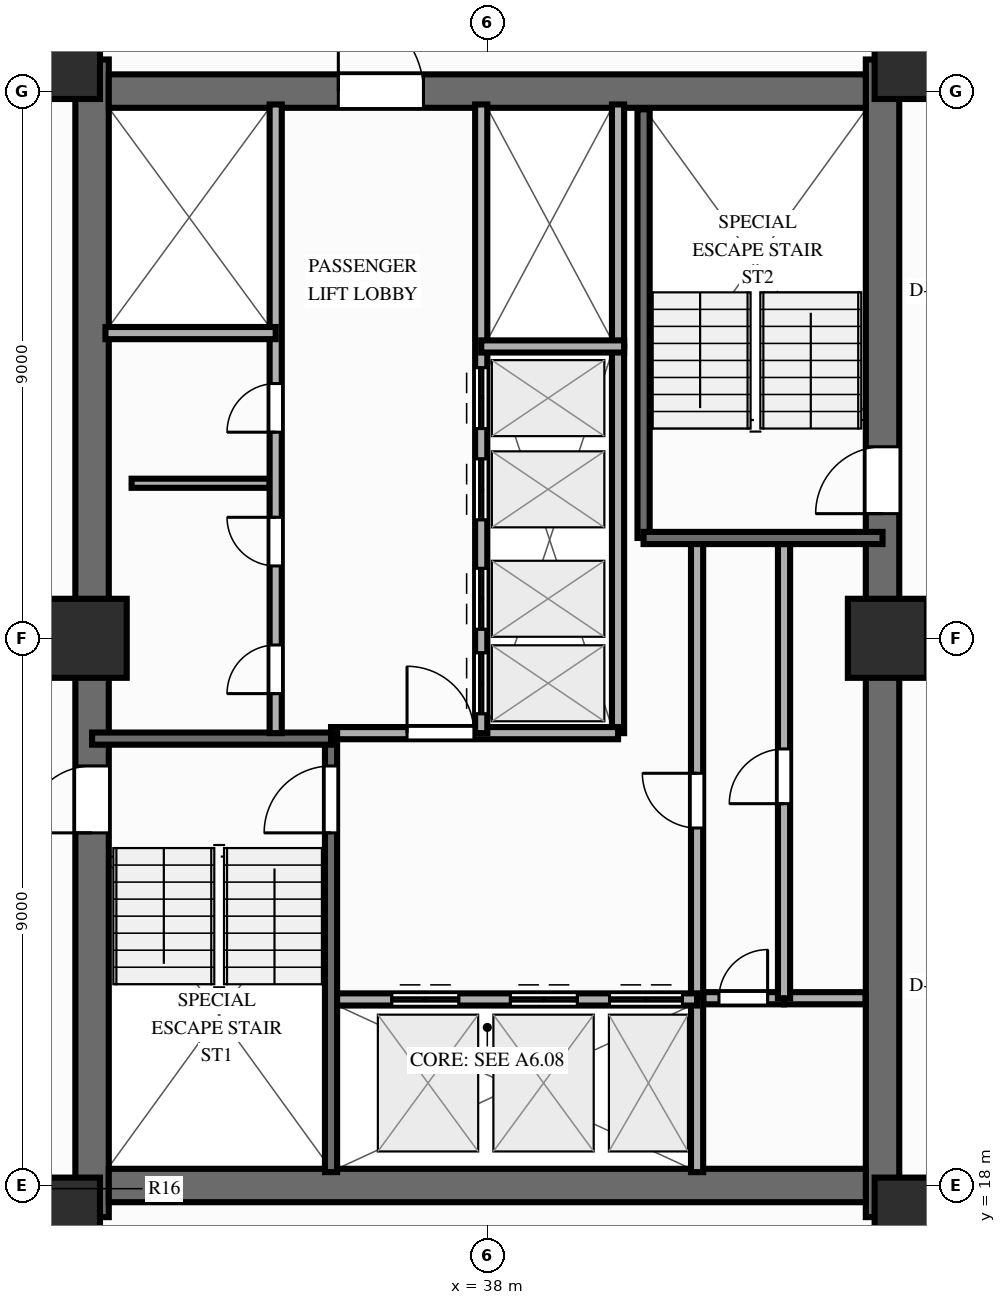
"""IFC4 building model, lengths in metres.
Left out: names, types, materials, properties, quantities, classifications, styles, units other than length and angle.
Written with IfcOpenShell. Run it as: python <this file> out.ifc"""

import sys

from ifc_helpers import new_model, si_unit, direction, frame, frame_2d, origin, origin_2d, place, context, subcontext, project, spatial, rectangle, extrude, source, transform, mapped, element, fill, save


model = new_model("IFC4")
c1 = context("Model", 3, precision=1e-05, world=origin(), true_north=direction((0.0, 1.0)))
c2 = subcontext(c1, "Body", "Model", "MODEL_VIEW")
j1 = project(units=[si_unit("LENGTHUNIT", "METRE"), si_unit("PLANEANGLEUNIT", "RADIAN")], contexts=[c1])
p1 = place(None, origin())
s1 = spatial("IfcSite", under=j1, at=p1, CompositionType="ELEMENT")
p2 = place(p1, origin())
s2 = spatial("IfcBuilding", under=s1, at=p2, CompositionType="ELEMENT")
p3 = place(p2, frame((0.0, 0.0, 104.85)))
s3 = spatial("IfcBuildingStorey", under=s2, at=p3, CompositionType="ELEMENT", Elevation=104.85)
p4 = place(p3, frame((31.5, 17.48, 0.0), z_axis=(0.0, 0.0, 1.0), x_axis=(0.0, 1.0, 0.0)))
e1 = element("IfcWall", 1, at=p4, inside=s3, PredefinedType="SHEAR", context=c2, shape_type="SweptSolid", body=[
    extrude(rectangle(XDim=19.04, YDim=0.55, at=frame_2d((9.52, 0.0))), origin(), (0.0, 0.0, 1.0), 3.0),
])
p5 = place(p4, frame((6.32, 0.0, 0.0)))
e2 = element("IfcOpeningElement", 2, at=p5, cuts=e1, PredefinedType="OPENING", context=c2, shape_type="SweptSolid", body=[
    extrude(rectangle(XDim=1.1, YDim=2.15, at=frame_2d((0.55, 1.075))), frame((0.0, 0.287, 0.0), z_axis=(0.0, -1.0, 0.0), x_axis=(1.0, 0.0, 0.0)), (0.0, 0.0, 1.0), 0.574),
])
p6 = place(p3, frame((44.5, 17.48, 0.0), z_axis=(0.0, 0.0, 1.0), x_axis=(0.0, 1.0, 0.0)))
e3 = element("IfcWall", 3, at=p6, inside=s3, PredefinedType="SHEAR", context=c2, shape_type="SweptSolid", body=[
    extrude(rectangle(XDim=19.04, YDim=0.55, at=frame_2d((9.52, 0.0))), origin(), (0.0, 0.0, 1.0), 3.0),
])
p7 = place(p6, frame((12.67, 0.0, 0.0), z_axis=(0.0, 0.0, 1.0), x_axis=(-1.0, 0.0, 0.0)))
e4 = element("IfcOpeningElement", 4, at=p7, cuts=e3, PredefinedType="OPENING", context=c2, shape_type="SweptSolid", body=[
    extrude(rectangle(XDim=1.1, YDim=2.15, at=frame_2d((0.55, 1.075))), frame((0.0, 0.287, 0.0), z_axis=(0.0, -1.0, 0.0), x_axis=(1.0, 0.0, 0.0)), (0.0, 0.0, 1.0), 0.574),
])
p8 = place(p3, frame((31.775, 18.0, 0.0), z_axis=(0.0, 0.0, 1.0), x_axis=(1.0, 0.0, 0.0)))
e5 = element("IfcWall", 5, at=p8, inside=s3, PredefinedType="SHEAR", context=c2, shape_type="SweptSolid", body=[
    extrude(rectangle(XDim=12.45, YDim=0.55, at=frame_2d((6.225, 0.0))), origin(), (0.0, 0.0, 1.0), 3.0),
])
p9 = place(p3, frame((31.775, 36.0, 0.0), z_axis=(0.0, 0.0, 1.0), x_axis=(1.0, 0.0, 0.0)))
e6 = element("IfcWall", 6, at=p9, inside=s3, PredefinedType="SHEAR", context=c2, shape_type="SweptSolid", body=[
    extrude(rectangle(XDim=12.45, YDim=0.55, at=frame_2d((6.225, 0.0))), origin(), (0.0, 0.0, 1.0), 3.0),
])
p10 = place(p9, frame((5.175, 0.0, 0.0), z_axis=(0.0, 0.0, 1.0), x_axis=(-1.0, 0.0, 0.0)))
e7 = element("IfcOpeningElement", 7, at=p10, cuts=e6, PredefinedType="OPENING", context=c2, shape_type="SweptSolid", body=[
    extrude(rectangle(XDim=1.4, YDim=2.15, at=frame_2d((0.7, 1.075))), frame((0.0, 0.287, 0.0), z_axis=(0.0, -1.0, 0.0), x_axis=(1.0, 0.0, 0.0)), (0.0, 0.0, 1.0), 0.574),
])
m1 = source(origin(), c2, "Body", "SweptSolid", [
    extrude(rectangle(XDim=1.3, YDim=1.3, at=origin_2d()), origin(), (0.0, 0.0, 1.0), 3.0),
])
for number, where, z_axis, x_axis in (
    (8, (30.98, 17.48, 0.0), (0.0, 0.0, 1.0), (1.0, 0.0, 0.0)),
    (9, (45.02, 17.48, 0.0), (0.0, 0.0, 1.0), (1.0, 0.0, 0.0)),
    (10, (30.98, 36.52, 0.0), (0.0, 0.0, 1.0), (1.0, 0.0, 0.0)),
    (11, (45.02, 36.52, 0.0), (0.0, 0.0, 1.0), (1.0, 0.0, 0.0)),
    (12, (31.42, 27.0, 0.0), (0.0, 0.0, 1.0), (1.0, 0.0, 0.0)),
    (13, (44.58, 27.0, 0.0), (0.0, 0.0, 1.0), (1.0, 0.0, 0.0)),
):
    element("IfcColumn", number, at=place(p3, frame(where, z_axis=z_axis, x_axis=x_axis)), inside=s3, PredefinedType="COLUMN", context=c2, shape_type="MappedRepresentation", body=[
        mapped(m1, transform((0.0, 0.0, 0.0), scale=1.0)),
    ])
p11 = place(p3, frame((32.15, 29.55, 0.0), z_axis=(0.0, 0.0, 1.0), x_axis=(1.0, 0.0, 0.0)))
e14 = element("IfcWall", 14, at=p11, inside=s3, PredefinedType="PARTITIONING", context=c2, shape_type="SweptSolid", body=[
    extrude(rectangle(XDim=2.27, YDim=0.15, at=frame_2d((1.135, 0.0))), origin(), (0.0, 0.0, 1.0), 2.79),
])
p12 = place(p3, frame((41.55, 21.08, 0.0), z_axis=(0.0, 0.0, 1.0), x_axis=(1.0, 0.0, 0.0)))
e15 = element("IfcWall", 15, at=p12, inside=s3, PredefinedType="PARTITIONING", context=c2, shape_type="SweptSolid", body=[
    extrude(rectangle(XDim=1.33, YDim=0.2, at=frame_2d((0.665, 0.0))), origin(), (0.0, 0.0, 1.0), 2.79),
])
p13 = place(p12, frame((0.26, 0.0, 0.0)))
e16 = element("IfcOpeningElement", 16, at=p13, cuts=e15, PredefinedType="OPENING", context=c2, shape_type="SweptSolid", body=[
    extrude(rectangle(XDim=0.8, YDim=2.05, at=frame_2d((0.4, 1.025))), frame((0.0, 0.112, 0.0), z_axis=(0.0, -1.0, 0.0), x_axis=(1.0, 0.0, 0.0)), (0.0, 0.0, 1.0), 0.224),
])
p14 = place(p3, frame((42.88, 21.08, 0.0), z_axis=(0.0, 0.0, 1.0), x_axis=(1.0, 0.0, 0.0)))
e17 = element("IfcWall", 17, at=p14, inside=s3, PredefinedType="PARTITIONING", context=c2, shape_type="SweptSolid", body=[
    extrude(rectangle(XDim=1.34, YDim=0.2, at=frame_2d((0.67, 0.0))), origin(), (0.0, 0.0, 1.0), 2.79),
])
p15 = place(p3, frame((42.88, 21.08, 0.0), z_axis=(0.0, 0.0, 1.0), x_axis=(0.0, 1.0, 0.0)))
e18 = element("IfcWall", 18, at=p15, inside=s3, PredefinedType="PARTITIONING", context=c2, shape_type="SweptSolid", body=[
    extrude(rectangle(XDim=7.47, YDim=0.2, at=frame_2d((3.735, 0.0))), origin(), (0.0, 0.0, 1.0), 2.79),
])
p16 = place(p15, frame((3.2, 0.0, 0.0)))
e19 = element("IfcOpeningElement", 19, at=p16, cuts=e18, PredefinedType="OPENING", context=c2, shape_type="SweptSolid", body=[
    extrude(rectangle(XDim=0.9, YDim=2.1, at=frame_2d((0.45, 1.05))), frame((0.0, 0.112, 0.0), z_axis=(0.0, -1.0, 0.0), x_axis=(1.0, 0.0, 0.0)), (0.0, 0.0, 1.0), 0.224),
])
p17 = place(p3, frame((41.45, 18.22, 0.0), z_axis=(0.0, 0.0, 1.0), x_axis=(0.0, 1.0, 0.0)))
e20 = element("IfcWall", 20, at=p17, inside=s3, PredefinedType="PARTITIONING", context=c2, shape_type="SweptSolid", body=[
    extrude(rectangle(XDim=2.86, YDim=0.2, at=frame_2d((1.43, 0.0))), origin(), (0.0, 0.0, 1.0), 2.79),
])
p18 = place(p3, frame((41.45, 21.08, 0.0), z_axis=(0.0, 0.0, 1.0), x_axis=(0.0, 1.0, 0.0)))
e21 = element("IfcWall", 21, at=p18, inside=s3, PredefinedType="PARTITIONING", context=c2, shape_type="SweptSolid", body=[
    extrude(rectangle(XDim=7.52, YDim=0.2, at=frame_2d((3.76, 0.0))), origin(), (0.0, 0.0, 1.0), 2.79),
])
p19 = place(p18, frame((2.8, 0.0, 0.0)))
e22 = element("IfcOpeningElement", 22, at=p19, cuts=e21, PredefinedType="OPENING", context=c2, shape_type="SweptSolid", body=[
    extrude(rectangle(XDim=0.9, YDim=2.1, at=frame_2d((0.45, 1.05))), frame((0.0, 0.112, 0.0), z_axis=(0.0, -1.0, 0.0), x_axis=(1.0, 0.0, 0.0)), (0.0, 0.0, 1.0), 0.224),
])
p20 = place(p3, frame((40.15, 25.44, 0.0), z_axis=(0.0, 0.0, 1.0), x_axis=(0.0, 1.0, 0.0)))
e23 = element("IfcWall", 23, at=p20, inside=s3, PredefinedType="PARTITIONING", context=c2, shape_type="SweptSolid", body=[
    extrude(rectangle(XDim=6.36, YDim=0.2, at=frame_2d((3.18, 0.0))), origin(), (0.0, 0.0, 1.0), 2.79),
])
p21 = place(p3, frame((40.15, 31.8, 0.0), z_axis=(0.0, 0.0, 1.0), x_axis=(0.0, 1.0, 0.0)))
e24 = element("IfcWall", 24, at=p21, inside=s3, PredefinedType="PARTITIONING", context=c2, shape_type="SweptSolid", body=[
    extrude(rectangle(XDim=3.98, YDim=0.2, at=frame_2d((1.99, 0.0))), origin(), (0.0, 0.0, 1.0), 2.79),
])
p22 = place(p3, frame((35.43, 21.06, 0.0), z_axis=(0.0, 0.0, 1.0), x_axis=(1.0, 0.0, 0.0)))
e25 = element("IfcWall", 25, at=p22, inside=s3, PredefinedType="PARTITIONING", context=c2, shape_type="SweptSolid", body=[
    extrude(rectangle(XDim=6.02, YDim=0.2, at=frame_2d((3.01, 0.0))), origin(), (0.0, 0.0, 1.0), 2.79),
])
p23 = place(p22, frame((1.0, 0.0, 0.0)))
e26 = element("IfcOpeningElement", 26, at=p23, cuts=e25, PredefinedType="OPENING", context=c2, shape_type="SweptSolid", body=[
    extrude(rectangle(XDim=1.1, YDim=2.15, at=frame_2d((0.55, 1.075))), frame((0.0, 0.112, 0.0), z_axis=(0.0, -1.0, 0.0), x_axis=(1.0, 0.0, 0.0)), (0.0, 0.0, 1.0), 0.224),
])
p24 = place(p22, frame((2.95, 0.0, 0.0)))
e27 = element("IfcOpeningElement", 27, at=p24, cuts=e25, PredefinedType="OPENING", context=c2, shape_type="SweptSolid", body=[
    extrude(rectangle(XDim=1.1, YDim=2.15, at=frame_2d((0.55, 1.075))), frame((0.0, 0.112, 0.0), z_axis=(0.0, -1.0, 0.0), x_axis=(1.0, 0.0, 0.0)), (0.0, 0.0, 1.0), 0.224),
])
p25 = place(p22, frame((4.58, 0.0, 0.0)))
e28 = element("IfcOpeningElement", 28, at=p25, cuts=e25, PredefinedType="OPENING", context=c2, shape_type="SweptSolid", body=[
    extrude(rectangle(XDim=1.2, YDim=2.15, at=frame_2d((0.6, 1.075))), frame((0.0, 0.112, 0.0), z_axis=(0.0, -1.0, 0.0), x_axis=(1.0, 0.0, 0.0)), (0.0, 0.0, 1.0), 0.224),
])
p26 = place(p3, frame((35.43, 25.44, 0.0), z_axis=(0.0, 0.0, 1.0), x_axis=(1.0, 0.0, 0.0)))
e29 = element("IfcWall", 29, at=p26, inside=s3, PredefinedType="PARTITIONING", context=c2, shape_type="SweptSolid", body=[
    extrude(rectangle(XDim=4.72, YDim=0.2, at=frame_2d((2.36, 0.0))), origin(), (0.0, 0.0, 1.0), 2.79),
])
p27 = place(p26, frame((1.25, 0.0, 0.0)))
e30 = element("IfcOpeningElement", 30, at=p27, cuts=e29, PredefinedType="OPENING", context=c2, shape_type="SweptSolid", body=[
    extrude(rectangle(XDim=1.1, YDim=2.15, at=frame_2d((0.55, 1.075))), frame((0.0, 0.112, 0.0), z_axis=(0.0, -1.0, 0.0), x_axis=(1.0, 0.0, 0.0)), (0.0, 0.0, 1.0), 0.224),
])
p28 = place(p3, frame((35.43, 18.22, 0.0), z_axis=(0.0, 0.0, 1.0), x_axis=(0.0, 1.0, 0.0)))
e31 = element("IfcWall", 31, at=p28, inside=s3, PredefinedType="SOLIDWALL", context=c2, shape_type="SweptSolid", body=[
    extrude(rectangle(XDim=7.22, YDim=0.2, at=frame_2d((3.61, 0.0))), origin(), (0.0, 0.0, 1.0), 2.79),
])
p29 = place(p28, frame((6.68, 0.0, 0.0), z_axis=(0.0, 0.0, 1.0), x_axis=(-1.0, 0.0, 0.0)))
e32 = element("IfcOpeningElement", 32, at=p29, cuts=e31, PredefinedType="OPENING", context=c2, shape_type="SweptSolid", body=[
    extrude(rectangle(XDim=1.1, YDim=2.15, at=frame_2d((0.55, 1.075))), frame((0.0, 0.112, 0.0), z_axis=(0.0, -1.0, 0.0), x_axis=(1.0, 0.0, 0.0)), (0.0, 0.0, 1.0), 0.224),
])
p30 = place(p3, frame((31.5, 25.35, 0.0), z_axis=(0.0, 0.0, 1.0), x_axis=(1.0, 0.0, 0.0)))
e33 = element("IfcWall", 33, at=p30, inside=s3, PredefinedType="SOLIDWALL", context=c2, shape_type="SweptSolid", body=[
    extrude(rectangle(XDim=3.93, YDim=0.2, at=frame_2d((1.965, 0.0))), origin(), (0.0, 0.0, 1.0), 2.79),
])
p31 = place(p3, frame((40.57, 28.65, 0.0), z_axis=(0.0, 0.0, 1.0), x_axis=(0.0, 1.0, 0.0)))
e34 = element("IfcWall", 34, at=p31, inside=s3, PredefinedType="SOLIDWALL", context=c2, shape_type="SweptSolid", body=[
    extrude(rectangle(XDim=7.05, YDim=0.2, at=frame_2d((3.525, 0.0))), origin(), (0.0, 0.0, 1.0), 2.79),
])
p32 = place(p3, frame((40.57, 28.65, 0.0), z_axis=(0.0, 0.0, 1.0), x_axis=(1.0, 0.0, 0.0)))
e35 = element("IfcWall", 35, at=p32, inside=s3, PredefinedType="SOLIDWALL", context=c2, shape_type="SweptSolid", body=[
    extrude(rectangle(XDim=3.93, YDim=0.2, at=frame_2d((1.965, 0.0))), origin(), (0.0, 0.0, 1.0), 2.79),
])
p33 = place(p3, frame((34.52, 25.44, 0.0), z_axis=(0.0, 0.0, 1.0), x_axis=(0.0, 1.0, 0.0)))
e36 = element("IfcWall", 36, at=p33, inside=s3, PredefinedType="PARTITIONING", context=c2, shape_type="SweptSolid", body=[
    extrude(rectangle(XDim=10.34, YDim=0.2, at=frame_2d((5.17, 0.0))), origin(), (0.0, 0.0, 1.0), 2.79),
])
p34 = place(p33, frame((0.65, 0.0, 0.0)))
e37 = element("IfcOpeningElement", 37, at=p34, cuts=e36, PredefinedType="OPENING", context=c2, shape_type="SweptSolid", body=[
    extrude(rectangle(XDim=0.8, YDim=2.05, at=frame_2d((0.4, 1.025))), frame((0.0, 0.112, 0.0), z_axis=(0.0, -1.0, 0.0), x_axis=(1.0, 0.0, 0.0)), (0.0, 0.0, 1.0), 0.224),
])
p35 = place(p33, frame((2.75, 0.0, 0.0)))
e38 = element("IfcOpeningElement", 38, at=p35, cuts=e36, PredefinedType="OPENING", context=c2, shape_type="SweptSolid", body=[
    extrude(rectangle(XDim=0.8, YDim=2.05, at=frame_2d((0.4, 1.025))), frame((0.0, 0.112, 0.0), z_axis=(0.0, -1.0, 0.0), x_axis=(1.0, 0.0, 0.0)), (0.0, 0.0, 1.0), 0.224),
])
p36 = place(p33, frame((4.95, 0.0, 0.0)))
e39 = element("IfcOpeningElement", 39, at=p36, cuts=e36, PredefinedType="OPENING", context=c2, shape_type="SweptSolid", body=[
    extrude(rectangle(XDim=0.8, YDim=2.05, at=frame_2d((0.4, 1.025))), frame((0.0, 0.112, 0.0), z_axis=(0.0, -1.0, 0.0), x_axis=(1.0, 0.0, 0.0)), (0.0, 0.0, 1.0), 0.224),
])
p37 = place(p3, frame((31.72, 32.02, 0.0), z_axis=(0.0, 0.0, 1.0), x_axis=(1.0, 0.0, 0.0)))
e40 = element("IfcWall", 40, at=p37, inside=s3, PredefinedType="PARTITIONING", context=c2, shape_type="SweptSolid", body=[
    extrude(rectangle(XDim=2.8, YDim=0.2, at=frame_2d((1.4, 0.0))), origin(), (0.0, 0.0, 1.0), 2.79),
])
p38 = place(p3, frame((37.9, 25.44, 0.0), z_axis=(0.0, 0.0, 1.0), x_axis=(0.0, 1.0, 0.0)))
e41 = element("IfcWall", 41, at=p38, inside=s3, PredefinedType="PARTITIONING", context=c2, shape_type="SweptSolid", body=[
    extrude(rectangle(XDim=10.34, YDim=0.2, at=frame_2d((5.17, 0.0))), origin(), (0.0, 0.0, 1.0), 2.79),
])
p39 = place(p38, frame((0.32, 0.0, 0.0)))
e42 = element("IfcOpeningElement", 42, at=p39, cuts=e41, PredefinedType="OPENING", context=c2, shape_type="SweptSolid", body=[
    extrude(rectangle(XDim=1.0, YDim=2.15, at=frame_2d((0.5, 1.075))), frame((0.0, 0.112, 0.0), z_axis=(0.0, -1.0, 0.0), x_axis=(1.0, 0.0, 0.0)), (0.0, 0.0, 1.0), 0.224),
])
p40 = place(p38, frame((1.71, 0.0, 0.0)))
e43 = element("IfcOpeningElement", 43, at=p40, cuts=e41, PredefinedType="OPENING", context=c2, shape_type="SweptSolid", body=[
    extrude(rectangle(XDim=1.0, YDim=2.15, at=frame_2d((0.5, 1.075))), frame((0.0, 0.112, 0.0), z_axis=(0.0, -1.0, 0.0), x_axis=(1.0, 0.0, 0.0)), (0.0, 0.0, 1.0), 0.224),
])
p41 = place(p38, frame((3.51, 0.0, 0.0)))
e44 = element("IfcOpeningElement", 44, at=p41, cuts=e41, PredefinedType="OPENING", context=c2, shape_type="SweptSolid", body=[
    extrude(rectangle(XDim=1.0, YDim=2.15, at=frame_2d((0.5, 1.075))), frame((0.0, 0.112, 0.0), z_axis=(0.0, -1.0, 0.0), x_axis=(1.0, 0.0, 0.0)), (0.0, 0.0, 1.0), 0.224),
])
p42 = place(p38, frame((5.01, 0.0, 0.0)))
e45 = element("IfcOpeningElement", 45, at=p42, cuts=e41, PredefinedType="OPENING", context=c2, shape_type="SweptSolid", body=[
    extrude(rectangle(XDim=1.0, YDim=2.15, at=frame_2d((0.5, 1.075))), frame((0.0, 0.112, 0.0), z_axis=(0.0, -1.0, 0.0), x_axis=(1.0, 0.0, 0.0)), (0.0, 0.0, 1.0), 0.224),
])
p43 = place(p3, frame((37.9, 31.8, 0.0), z_axis=(0.0, 0.0, 1.0), x_axis=(1.0, 0.0, 0.0)))
e46 = element("IfcWall", 46, at=p43, inside=s3, PredefinedType="PARTITIONING", context=c2, shape_type="SweptSolid", body=[
    extrude(rectangle(XDim=2.35, YDim=0.2, at=frame_2d((1.175, 0.0))), origin(), (0.0, 0.0, 1.0), 2.79),
])
m2 = source(origin(), c2, "Body", "SweptSolid", [
    extrude(rectangle(XDim=1.1, YDim=2.15, at=frame_2d((0.55, 1.075))), frame((0.0, 0.025, 0.0), z_axis=(0.0, -1.0, 0.0), x_axis=(1.0, 0.0, 0.0)), (0.0, 0.0, 1.0), 0.05),
])
p44 = place(p5, origin())
e47 = element("IfcDoor", 47, at=p44, inside=s3, OperationType="SINGLE_SWING_LEFT", PredefinedType="DOOR", context=c2, shape_type="MappedRepresentation", body=[
    mapped(m2, transform((0.0, 0.0, 0.0), scale=1.0)),
])
fill(e2, e47)
p45 = place(p7, origin())
e48 = element("IfcDoor", 48, at=p45, inside=s3, OperationType="SINGLE_SWING_RIGHT", PredefinedType="DOOR", context=c2, shape_type="MappedRepresentation", body=[
    mapped(m2, transform((0.0, 0.0, 0.0), scale=1.0)),
])
fill(e4, e48)
m3 = source(origin(), c2, "Body", "SweptSolid", [
    extrude(rectangle(XDim=1.4, YDim=2.15, at=frame_2d((0.7, 1.075))), frame((0.0, 0.025, 0.0), z_axis=(0.0, -1.0, 0.0), x_axis=(1.0, 0.0, 0.0)), (0.0, 0.0, 1.0), 0.05),
])
p46 = place(p10, origin())
e49 = element("IfcDoor", 49, at=p46, inside=s3, OperationType="SINGLE_SWING_RIGHT", PredefinedType="DOOR", context=c2, shape_type="MappedRepresentation", body=[
    mapped(m3, transform((0.0, 0.0, 0.0), scale=1.0)),
])
fill(e7, e49)
m4 = source(origin(), c2, "Body", "SweptSolid", [
    extrude(rectangle(XDim=0.8, YDim=2.05, at=frame_2d((0.4, 1.025))), frame((0.0, 0.025, 0.0), z_axis=(0.0, -1.0, 0.0), x_axis=(1.0, 0.0, 0.0)), (0.0, 0.0, 1.0), 0.05),
])
p47 = place(p13, origin())
e50 = element("IfcDoor", 50, at=p47, inside=s3, OperationType="SINGLE_SWING_RIGHT", PredefinedType="DOOR", context=c2, shape_type="MappedRepresentation", body=[
    mapped(m4, transform((0.0, 0.0, 0.0), scale=1.0)),
])
fill(e16, e50)
m5 = source(origin(), c2, "Body", "SweptSolid", [
    extrude(rectangle(XDim=0.9, YDim=2.1, at=frame_2d((0.45, 1.05))), frame((0.0, 0.025, 0.0), z_axis=(0.0, -1.0, 0.0), x_axis=(1.0, 0.0, 0.0)), (0.0, 0.0, 1.0), 0.05),
])
p48 = place(p16, origin())
e51 = element("IfcDoor", 51, at=p48, inside=s3, OperationType="SINGLE_SWING_LEFT", PredefinedType="DOOR", context=c2, shape_type="MappedRepresentation", body=[
    mapped(m5, transform((0.0, 0.0, 0.0), scale=1.0)),
])
fill(e19, e51)
p49 = place(p19, origin())
e52 = element("IfcDoor", 52, at=p49, inside=s3, OperationType="SINGLE_SWING_RIGHT", PredefinedType="DOOR", context=c2, shape_type="MappedRepresentation", body=[
    mapped(m5, transform((0.0, 0.0, 0.0), scale=1.0)),
])
fill(e22, e52)
p50 = place(p23, origin())
e53 = element("IfcDoor", 53, at=p50, inside=s3, OperationType="DOUBLE_DOOR_SLIDING", PredefinedType="DOOR", context=c2, shape_type="MappedRepresentation", body=[
    mapped(m2, transform((0.0, 0.0, 0.0), scale=1.0)),
])
fill(e26, e53)
p51 = place(p24, origin())
e54 = element("IfcDoor", 54, at=p51, inside=s3, OperationType="DOUBLE_DOOR_SLIDING", PredefinedType="DOOR", context=c2, shape_type="MappedRepresentation", body=[
    mapped(m2, transform((0.0, 0.0, 0.0), scale=1.0)),
])
fill(e27, e54)
m6 = source(origin(), c2, "Body", "SweptSolid", [
    extrude(rectangle(XDim=1.2, YDim=2.15, at=frame_2d((0.6, 1.075))), frame((0.0, 0.025, 0.0), z_axis=(0.0, -1.0, 0.0), x_axis=(1.0, 0.0, 0.0)), (0.0, 0.0, 1.0), 0.05),
])
p52 = place(p25, origin())
e55 = element("IfcDoor", 55, at=p52, inside=s3, OperationType="DOUBLE_DOOR_SLIDING", PredefinedType="DOOR", context=c2, shape_type="MappedRepresentation", body=[
    mapped(m6, transform((0.0, 0.0, 0.0), scale=1.0)),
])
fill(e28, e55)
p53 = place(p27, origin())
e56 = element("IfcDoor", 56, at=p53, inside=s3, OperationType="SINGLE_SWING_LEFT", PredefinedType="DOOR", context=c2, shape_type="MappedRepresentation", body=[
    mapped(m2, transform((0.0, 0.0, 0.0), scale=1.0)),
])
fill(e30, e56)
p54 = place(p29, origin())
e57 = element("IfcDoor", 57, at=p54, inside=s3, OperationType="SINGLE_SWING_RIGHT", PredefinedType="DOOR", context=c2, shape_type="MappedRepresentation", body=[
    mapped(m2, transform((0.0, 0.0, 0.0), scale=1.0)),
])
fill(e32, e57)
p55 = place(p34, origin())
e58 = element("IfcDoor", 58, at=p55, inside=s3, OperationType="SINGLE_SWING_LEFT", PredefinedType="DOOR", context=c2, shape_type="MappedRepresentation", body=[
    mapped(m4, transform((0.0, 0.0, 0.0), scale=1.0)),
])
fill(e37, e58)
p56 = place(p35, origin())
e59 = element("IfcDoor", 59, at=p56, inside=s3, OperationType="SINGLE_SWING_RIGHT", PredefinedType="DOOR", context=c2, shape_type="MappedRepresentation", body=[
    mapped(m4, transform((0.0, 0.0, 0.0), scale=1.0)),
])
fill(e38, e59)
p57 = place(p36, origin())
e60 = element("IfcDoor", 60, at=p57, inside=s3, OperationType="SINGLE_SWING_LEFT", PredefinedType="DOOR", context=c2, shape_type="MappedRepresentation", body=[
    mapped(m4, transform((0.0, 0.0, 0.0), scale=1.0)),
])
fill(e39, e60)
m7 = source(origin(), c2, "Body", "SweptSolid", [
    extrude(rectangle(XDim=1.0, YDim=2.15, at=frame_2d((0.5, 1.075))), frame((0.0, 0.025, 0.0), z_axis=(0.0, -1.0, 0.0), x_axis=(1.0, 0.0, 0.0)), (0.0, 0.0, 1.0), 0.05),
])
p58 = place(p39, origin())
e61 = element("IfcDoor", 61, at=p58, inside=s3, OperationType="DOUBLE_DOOR_SLIDING", PredefinedType="DOOR", context=c2, shape_type="MappedRepresentation", body=[
    mapped(m7, transform((0.0, 0.0, 0.0), scale=1.0)),
])
fill(e42, e61)
p59 = place(p40, origin())
e62 = element("IfcDoor", 62, at=p59, inside=s3, OperationType="DOUBLE_DOOR_SLIDING", PredefinedType="DOOR", context=c2, shape_type="MappedRepresentation", body=[
    mapped(m7, transform((0.0, 0.0, 0.0), scale=1.0)),
])
fill(e43, e62)
p60 = place(p41, origin())
e63 = element("IfcDoor", 63, at=p60, inside=s3, OperationType="DOUBLE_DOOR_SLIDING", PredefinedType="DOOR", context=c2, shape_type="MappedRepresentation", body=[
    mapped(m7, transform((0.0, 0.0, 0.0), scale=1.0)),
])
fill(e44, e63)
p61 = place(p42, origin())
e64 = element("IfcDoor", 64, at=p61, inside=s3, OperationType="DOUBLE_DOOR_SLIDING", PredefinedType="DOOR", context=c2, shape_type="MappedRepresentation", body=[
    mapped(m7, transform((0.0, 0.0, 0.0), scale=1.0)),
])
fill(e45, e64)
save(model, sys.argv[1])
